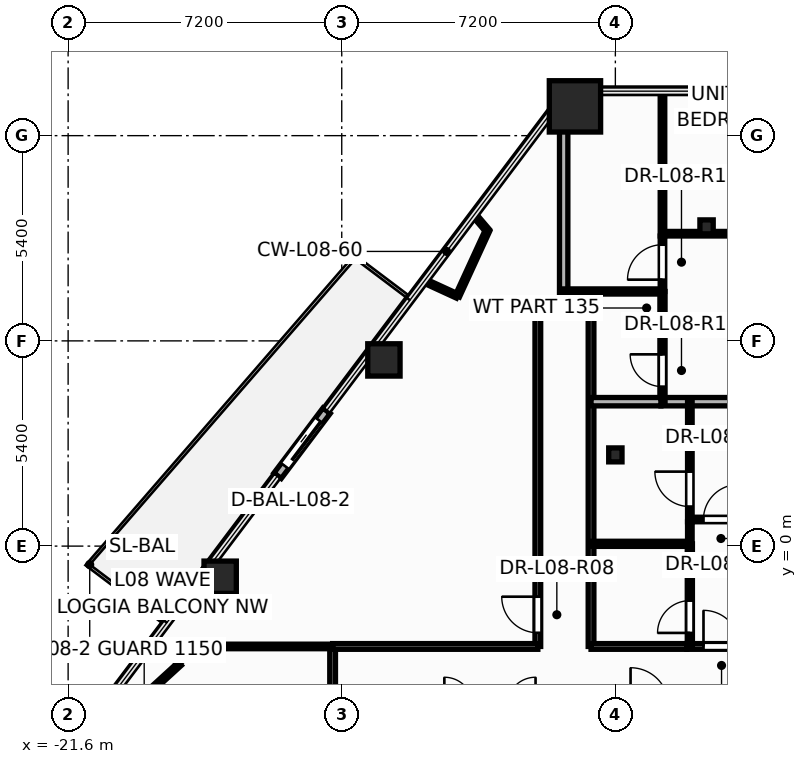
"""IFC4 building model, lengths in metres.
Left out: names, types, materials, properties, quantities, classifications, styles, units other than length and angle.
Written with IfcOpenShell. Run it as: python <this file> out.ifc"""

import sys

from ifc_helpers import new_model, si_unit, direction, frame, frame_2d, origin, origin_2d, place, context, subcontext, project, spatial, rectangle, hollow_rectangle, hollow_circle, i_section, extrude, element, fill, save


model = new_model("IFC4")
c1 = context("Model", 3, precision=1e-05, world=origin(), true_north=direction((0.0, 1.0)))
c2 = subcontext(c1, "Body", "Model", "MODEL_VIEW")
j1 = project(units=[si_unit("LENGTHUNIT", "METRE"), si_unit("PLANEANGLEUNIT", "RADIAN")], contexts=[c1])
p1 = place(None, origin())
s1 = spatial("IfcSite", under=j1, at=p1, CompositionType="ELEMENT")
p2 = place(p1, origin())
s2 = spatial("IfcBuilding", under=s1, at=p2, CompositionType="ELEMENT")
p3 = place(p2, frame((0.0, 0.0, 35.1)))
s3 = spatial("IfcBuildingStorey", under=s2, at=p3, CompositionType="ELEMENT", Elevation=35.1)
p4 = place(p3, frame((-8.263, 11.57, 0.0), z_axis=(0.0, 0.0, 1.0), x_axis=(1.0, 0.0, 0.0)))
e1 = element("IfcColumn", 1, at=p4, inside=s3, PredefinedType="COLUMN", context=c2, shape_type="SweptSolid", body=[
    extrude(hollow_rectangle(XDim=1.35, YDim=1.35, WallThickness=0.065, at=origin_2d()), origin(), (0.0, 0.0, 1.0), 3.6),
])
for number, where, z_axis, x_axis in (
    (2, (-13.29, 4.899, 0.0), (0.0, 0.0, 1.0), (1.0, 0.0, 0.0)),
    (3, (-17.599, -0.819, 0.0), (0.0, 0.0, 1.0), (1.0, 0.0, 0.0)),
):
    element("IfcColumn", number, at=place(p3, frame(where, z_axis=z_axis, x_axis=x_axis)), inside=s3, PredefinedType="COLUMN", context=c2, shape_type="SweptSolid", body=[
        extrude(hollow_circle(Radius=0.425, WallThickness=0.038, at=origin_2d()), origin(), (0.0, 0.0, 1.0), 3.6),
    ])
for number, where, z_axis, x_axis in (
    (4, (-7.2, 2.4, 0.0), (0.0, 0.0, 1.0), (1.0, 0.0, 0.0)),
    (5, (-4.8, 8.4, 0.0), (0.0, 0.0, 1.0), (1.0, 0.0, 0.0)),
):
    element("IfcColumn", number, at=place(p3, frame(where, z_axis=z_axis, x_axis=x_axis)), inside=s3, PredefinedType="COLUMN", context=c2, shape_type="SweptSolid", body=[
        extrude(i_section(OverallWidth=0.35, OverallDepth=0.367, WebThickness=0.025, FlangeThickness=0.032, at=origin_2d()), origin(), (0.0, 0.0, 1.0), 3.6),
    ])
p5 = place(p3, frame((-14.8, 3.561, -0.015), z_axis=(0.0, 0.0, 1.0), x_axis=(-0.601823875366, -0.798628839349, 0.0)))
e6 = element("IfcWall", 6, at=p5, inside=s3, PredefinedType="STANDARD", context=c2, shape_type="SweptSolid", body=[
    extrude(rectangle(XDim=2.14, YDim=0.24, at=frame_2d((1.07, 0.0))), origin(), (0.0, 0.0, 1.0), 2.729),
])
p6 = place(p5, frame((0.32, 0.0, 0.015)))
e7 = element("IfcOpeningElement", 7, at=p6, cuts=e6, PredefinedType="OPENING", context=c2, shape_type="SweptSolid", body=[
    extrude(rectangle(XDim=1.506, YDim=2.204, at=frame_2d((0.75, 1.102))), frame((0.0, 0.13, 0.0), z_axis=(0.0, -1.0, 0.0), x_axis=(1.0, 0.0, 0.0)), (0.0, 0.0, 1.0), 0.26),
])
p7 = place(p3, frame((-5.32, -2.64, 0.0), z_axis=(0.0, 0.0, 1.0), x_axis=(1.0, 0.0, 0.0)))
e8 = element("IfcWall", 8, at=p7, inside=s3, PredefinedType="PARTITIONING", context=c2, shape_type="SweptSolid", body=[
    extrude(rectangle(XDim=13.16, YDim=0.15, at=frame_2d((6.58, 0.0))), origin(), (0.0, 0.0, 1.0), 2.325),
])
p8 = place(p7, frame((0.439, 0.0, 0.0)))
e9 = element("IfcOpeningElement", 9, at=p8, cuts=e8, PredefinedType="OPENING", context=c2, shape_type="SweptSolid", body=[
    extrude(rectangle(XDim=0.956, YDim=2.104, at=frame_2d((0.475, 1.052))), frame((0.0, 0.085, 0.0), z_axis=(0.0, -1.0, 0.0), x_axis=(1.0, 0.0, 0.0)), (0.0, 0.0, 1.0), 0.17),
])
p9 = place(p3, frame((-9.24, -2.64, 0.0), z_axis=(0.0, 0.0, 1.0), x_axis=(0.0, 1.0, 0.0)))
e10 = element("IfcWall", 10, at=p9, inside=s3, PredefinedType="PARTITIONING", context=c2, shape_type="SweptSolid", body=[
    extrude(rectangle(XDim=8.84, YDim=0.15, at=frame_2d((4.42, 0.0))), origin(), (0.0, 0.0, 1.0), 2.325),
])
p10 = place(p9, frame((0.359, 0.0, 0.0)))
e11 = element("IfcOpeningElement", 11, at=p10, cuts=e10, PredefinedType="OPENING", context=c2, shape_type="SweptSolid", body=[
    extrude(rectangle(XDim=0.956, YDim=2.104, at=frame_2d((0.475, 1.052))), frame((0.0, 0.085, 0.0), z_axis=(0.0, -1.0, 0.0), x_axis=(1.0, 0.0, 0.0)), (0.0, 0.0, 1.0), 0.17),
])
p11 = place(p3, frame((-14.64, -10.8, 0.0), z_axis=(0.0, 0.0, 1.0), x_axis=(0.0, 1.0, 0.0)))
e12 = element("IfcWall", 12, at=p11, inside=s3, PredefinedType="PARTITIONING", context=c2, shape_type="SweptSolid", body=[
    extrude(rectangle(XDim=8.16, YDim=0.15, at=frame_2d((4.08, 0.0))), origin(), (0.0, 0.0, 1.0), 2.325),
])
p12 = place(p11, frame((0.359, 0.0, 0.0)))
e13 = element("IfcOpeningElement", 13, at=p12, cuts=e12, PredefinedType="OPENING", context=c2, shape_type="SweptSolid", body=[
    extrude(rectangle(XDim=0.956, YDim=2.104, at=frame_2d((0.475, 1.052))), frame((0.0, 0.085, 0.0), z_axis=(0.0, -1.0, 0.0), x_axis=(1.0, 0.0, 0.0)), (0.0, 0.0, 1.0), 0.17),
])
p13 = place(p3, frame((-5.96, 8.22, 0.0), z_axis=(0.0, 0.0, 1.0), x_axis=(1.0, 0.0, 0.0)))
e14 = element("IfcWall", 14, at=p13, inside=s3, PredefinedType="PARTITIONING", context=c2, shape_type="SweptSolid", body=[
    extrude(rectangle(XDim=7.32, YDim=0.12, at=frame_2d((3.66, 0.0))), origin(), (0.0, 0.0, 1.0), 2.325),
])
p14 = place(p13, frame((3.101, 0.0, 0.0)))
e15 = element("IfcOpeningElement", 15, at=p14, cuts=e14, PredefinedType="OPENING", context=c2, shape_type="SweptSolid", body=[
    extrude(rectangle(XDim=0.926, YDim=2.104, at=frame_2d((0.46, 1.052))), frame((0.0, 0.07, 0.0), z_axis=(0.0, -1.0, 0.0), x_axis=(1.0, 0.0, 0.0)), (0.0, 0.0, 1.0), 0.14),
])
p15 = place(p3, frame((-6.0, 3.8, 0.0), z_axis=(0.0, 0.0, 1.0), x_axis=(1.0, 0.0, 0.0)))
e16 = element("IfcWall", 16, at=p15, inside=s3, PredefinedType="PARTITIONING", context=c2, shape_type="SweptSolid", body=[
    extrude(rectangle(XDim=13.84, YDim=0.22, at=frame_2d((6.92, 0.0))), origin(), (0.0, 0.0, 1.0), 2.325),
])
p16 = place(p3, frame((-5.24, 0.7, 0.0), z_axis=(0.0, 0.0, 1.0), x_axis=(1.0, 0.0, 0.0)))
e17 = element("IfcWall", 17, at=p16, inside=s3, PredefinedType="PARTITIONING", context=c2, shape_type="SweptSolid", body=[
    extrude(rectangle(XDim=6.078, YDim=0.12, at=frame_2d((3.039, 0.0))), origin(), (0.0, 0.0, 1.0), 2.325),
])
p17 = place(p16, frame((0.358, 0.0, 0.0)))
e18 = element("IfcOpeningElement", 18, at=p17, cuts=e17, PredefinedType="OPENING", context=c2, shape_type="SweptSolid", body=[
    extrude(rectangle(XDim=0.926, YDim=2.104, at=frame_2d((0.46, 1.052))), frame((0.0, 0.07, 0.0), z_axis=(0.0, -1.0, 0.0), x_axis=(1.0, 0.0, 0.0)), (0.0, 0.0, 1.0), 0.14),
])
p18 = place(p3, frame((-14.64, -2.64, 0.0), z_axis=(0.0, 0.0, 1.0), x_axis=(1.0, 0.0, 0.0)))
e19 = element("IfcWall", 19, at=p18, inside=s3, PredefinedType="PARTITIONING", context=c2, shape_type="SweptSolid", body=[
    extrude(rectangle(XDim=5.4, YDim=0.15, at=frame_2d((2.7, 0.0))), origin(), (0.0, 0.0, 1.0), 3.35),
])
p19 = place(p3, frame((-8.56, 6.2, 0.0), z_axis=(0.0, 0.0, 1.0), x_axis=(0.0, 1.0, 0.0)))
e20 = element("IfcWall", 20, at=p19, inside=s3, PredefinedType="PARTITIONING", context=c2, shape_type="SweptSolid", body=[
    extrude(rectangle(XDim=5.641, YDim=0.22, at=frame_2d((2.821, 0.0))), origin(), (0.0, 0.0, 1.0), 2.325),
])
p20 = place(p3, frame((-19.28, -2.64, 0.0), z_axis=(0.0, 0.0, 1.0), x_axis=(1.0, 0.0, 0.0)))
e21 = element("IfcWall", 21, at=p20, inside=s3, PredefinedType="PARTITIONING", context=c2, shape_type="SweptSolid", body=[
    extrude(rectangle(XDim=4.64, YDim=0.12, at=frame_2d((2.32, 0.0))), origin(), (0.0, 0.0, 1.0), 2.713),
])
p21 = place(p3, frame((-7.84, -2.64, 0.0), z_axis=(0.0, 0.0, 1.0), x_axis=(0.0, 1.0, 0.0)))
e22 = element("IfcWall", 22, at=p21, inside=s3, PredefinedType="PARTITIONING", context=c2, shape_type="SweptSolid", body=[
    extrude(rectangle(XDim=8.84, YDim=0.15, at=frame_2d((4.42, 0.0))), origin(), (0.0, 0.0, 1.0), 2.325),
])
p22 = place(p3, frame((-5.96, 8.16, 0.0), z_axis=(0.0, 0.0, 1.0), x_axis=(0.0, 1.0, 0.0)))
e23 = element("IfcWall", 23, at=p22, inside=s3, PredefinedType="PARTITIONING", context=c2, shape_type="SweptSolid", body=[
    extrude(rectangle(XDim=3.811, YDim=0.12, at=frame_2d((1.905, 0.0))), origin(), (0.0, 0.0, 1.0), 2.325),
])
p23 = place(p3, frame((-5.24, 0.64, 0.0), z_axis=(0.0, 0.0, 1.0), x_axis=(0.0, 1.0, 0.0)))
e24 = element("IfcWall", 24, at=p23, inside=s3, PredefinedType="PARTITIONING", context=c2, shape_type="SweptSolid", body=[
    extrude(rectangle(XDim=3.16, YDim=0.12, at=frame_2d((1.58, 0.0))), origin(), (0.0, 0.0, 1.0), 2.325),
])
p24 = place(p23, frame((0.4, 0.0, 0.0)))
e25 = element("IfcOpeningElement", 25, at=p24, cuts=e24, PredefinedType="OPENING", context=c2, shape_type="SweptSolid", body=[
    extrude(rectangle(XDim=0.926, YDim=2.104, at=frame_2d((0.46, 1.052))), frame((0.0, 0.07, 0.0), z_axis=(0.0, -1.0, 0.0), x_axis=(1.0, 0.0, 0.0)), (0.0, 0.0, 1.0), 0.14),
])
p25 = place(p3, frame((-5.96, 3.8, 0.0), z_axis=(0.0, 0.0, 1.0), x_axis=(0.0, 1.0, 0.0)))
e26 = element("IfcWall", 26, at=p25, inside=s3, PredefinedType="PARTITIONING", context=c2, shape_type="SweptSolid", body=[
    extrude(rectangle(XDim=2.9, YDim=0.135, at=frame_2d((1.45, 0.0))), origin(), (0.0, 0.0, 1.0), 2.325),
])
p26 = place(p25, frame((0.396, 0.0, 0.0)))
e27 = element("IfcOpeningElement", 27, at=p26, cuts=e26, PredefinedType="OPENING", context=c2, shape_type="SweptSolid", body=[
    extrude(rectangle(XDim=0.856, YDim=2.104, at=frame_2d((0.425, 1.052))), frame((0.0, 0.078, 0.0), z_axis=(0.0, -1.0, 0.0), x_axis=(1.0, 0.0, 0.0)), (0.0, 0.0, 1.0), 0.155),
])
p27 = place(p3, frame((-5.24, -2.64, 0.0), z_axis=(0.0, 0.0, 1.0), x_axis=(0.0, 1.0, 0.0)))
e28 = element("IfcWall", 28, at=p27, inside=s3, PredefinedType="PARTITIONING", context=c2, shape_type="SweptSolid", body=[
    extrude(rectangle(XDim=2.7, YDim=0.135, at=frame_2d((1.35, 0.0))), origin(), (0.0, 0.0, 1.0), 3.35),
])
p28 = place(p27, frame((0.356, 0.0, 0.0)))
e29 = element("IfcOpeningElement", 29, at=p28, cuts=e28, PredefinedType="OPENING", context=c2, shape_type="SweptSolid", body=[
    extrude(rectangle(XDim=0.856, YDim=2.104, at=frame_2d((0.425, 1.052))), frame((0.0, 0.078, 0.0), z_axis=(0.0, -1.0, 0.0), x_axis=(1.0, 0.0, 0.0)), (0.0, 0.0, 1.0), 0.155),
])
p29 = place(p3, frame((-7.84, -2.64, 0.0), z_axis=(0.0, 0.0, 1.0), x_axis=(1.0, 0.0, 0.0)))
e30 = element("IfcWall", 30, at=p29, inside=s3, PredefinedType="PARTITIONING", context=c2, shape_type="SweptSolid", body=[
    extrude(rectangle(XDim=2.518, YDim=0.15, at=frame_2d((1.259, 0.0))), origin(), (0.0, 0.0, 1.0), 2.325),
])
for number, where, z_axis, x_axis in (
    (31, (-8.56, 6.7, 0.0), (0.0, 0.0, 1.0), (1.0, 0.0, 0.0)),
    (32, (-7.84, 0.06, 0.0), (0.0, 0.0, 1.0), (1.0, 0.0, 0.0)),
):
    element("IfcWall", number, at=place(p3, frame(where, z_axis=z_axis, x_axis=x_axis)), inside=s3, PredefinedType="PARTITIONING", context=c2, shape_type="SweptSolid", body=[
        extrude(rectangle(XDim=2.6, YDim=0.135, at=frame_2d((1.3, 0.0))), origin(), (0.0, 0.0, 1.0), 2.325),
    ])
p30 = place(p3, frame((-18.662, -3.096, 0.0), z_axis=(0.0, 0.0, 1.0), x_axis=(-0.738587935194, -0.674157149325, 0.0)))
e33 = element("IfcWall", 33, at=p30, inside=s3, PredefinedType="PARTITIONING", context=c2, shape_type="SweptSolid", body=[
    extrude(rectangle(XDim=2.012, YDim=0.12, at=frame_2d((1.006, 0.0))), origin(), (0.0, 0.0, 1.0), 3.35),
])
p31 = place(p3, frame((-7.84, 3.8, 0.0), z_axis=(0.0, 0.0, 1.0), x_axis=(1.0, 0.0, 0.0)))
e34 = element("IfcWall", 34, at=p31, inside=s3, PredefinedType="PARTITIONING", context=c2, shape_type="SweptSolid", body=[
    extrude(rectangle(XDim=1.838, YDim=0.22, at=frame_2d((0.919, 0.0))), origin(), (0.0, 0.0, 1.0), 2.325),
])
p32 = place(p3, frame((-10.565, 8.302, 0.0), z_axis=(0.0, 0.0, 1.0), x_axis=(-0.417514536704, -0.90867024362, 0.0)))
e35 = element("IfcWall", 35, at=p32, inside=s3, PredefinedType="PARTITIONING", context=c2, shape_type="SweptSolid", body=[
    extrude(rectangle(XDim=1.896, YDim=0.12, at=frame_2d((0.948, 0.0))), origin(), (0.0, 0.0, 1.0), 3.35),
])
p33 = place(p3, frame((-5.96, 6.7, 0.0), z_axis=(0.0, 0.0, 1.0), x_axis=(0.0, 1.0, 0.0)))
e36 = element("IfcWall", 36, at=p33, inside=s3, PredefinedType="PARTITIONING", context=c2, shape_type="SweptSolid", body=[
    extrude(rectangle(XDim=1.458, YDim=0.12, at=frame_2d((0.729, 0.0))), origin(), (0.0, 0.0, 1.0), 2.325),
])
p34 = place(p33, frame((0.311, 0.0, 0.0)))
e37 = element("IfcOpeningElement", 37, at=p34, cuts=e36, PredefinedType="OPENING", context=c2, shape_type="SweptSolid", body=[
    extrude(rectangle(XDim=0.926, YDim=2.104, at=frame_2d((0.46, 1.052))), frame((0.0, 0.07, 0.0), z_axis=(0.0, -1.0, 0.0), x_axis=(1.0, 0.0, 0.0)), (0.0, 0.0, 1.0), 0.14),
])
p35 = place(p3, frame((-11.356, 6.579, 0.0), z_axis=(0.0, 0.0, 1.0), x_axis=(-0.908713919018, 0.417419469339, 0.0)))
e38 = element("IfcWall", 38, at=p35, inside=s3, PredefinedType="PARTITIONING", context=c2, shape_type="SweptSolid", body=[
    extrude(rectangle(XDim=0.945, YDim=0.12, at=frame_2d((0.473, 0.0))), origin(), (0.0, 0.0, 1.0), 2.713),
])
p36 = place(p3, frame((-19.287, -2.411, 0.0), z_axis=(0.0, 0.0, 1.0), x_axis=(0.674125797279, -0.738616551021, 0.0)))
e39 = element("IfcWall", 39, at=p36, inside=s3, PredefinedType="PARTITIONING", context=c2, shape_type="SweptSolid", body=[
    extrude(rectangle(XDim=0.927, YDim=0.12, at=frame_2d((0.464, 0.0))), origin(), (0.0, 0.0, 1.0), 2.713),
])
p37 = place(p3, frame((-9.24, 6.2, 0.0), z_axis=(0.0, 0.0, 1.0), x_axis=(1.0, 0.0, 0.0)))
e40 = element("IfcWall", 40, at=p37, inside=s3, PredefinedType="PARTITIONING", context=c2, shape_type="SweptSolid", body=[
    extrude(rectangle(XDim=1.4, YDim=0.15, at=frame_2d((0.7, 0.0))), origin(), (0.0, 0.0, 1.0), 3.35),
])
p38 = place(p3, frame((-5.24, 0.06, 0.0), z_axis=(0.0, 0.0, 1.0), x_axis=(0.0, 1.0, 0.0)))
e41 = element("IfcWall", 41, at=p38, inside=s3, PredefinedType="PARTITIONING", context=c2, shape_type="SweptSolid", body=[
    extrude(rectangle(XDim=0.578, YDim=0.12, at=frame_2d((0.289, 0.0))), origin(), (0.0, 0.0, 1.0), 3.35),
])
p39 = place(p3, frame((-10.909, 8.707, 0.0), z_axis=(0.0, 0.0, 1.0), x_axis=(0.648594610132, -0.761134043193, 0.0)))
e42 = element("IfcWall", 42, at=p39, inside=s3, PredefinedType="PARTITIONING", context=c2, shape_type="SweptSolid", body=[
    extrude(rectangle(XDim=0.531, YDim=0.12, at=frame_2d((0.266, 0.0))), origin(), (0.0, 0.0, 1.0), 2.713),
])
p40 = place(p6, origin())
e43 = element("IfcDoor", 43, at=p40, inside=s3, OperationType="SLIDING_TO_RIGHT", PredefinedType="DOOR", context=c2, shape_type="SweptSolid", body=[
    extrude(rectangle(XDim=1.5, YDim=2.2, at=frame_2d((0.75, 1.1))), frame((0.0, 0.025, 0.0), z_axis=(0.0, -1.0, 0.0), x_axis=(1.0, 0.0, 0.0)), (0.0, 0.0, 1.0), 0.05),
])
fill(e7, e43)
p41 = place(p10, origin())
e44 = element("IfcDoor", 44, at=p41, inside=s3, OperationType="SINGLE_SWING_RIGHT", PredefinedType="DOOR", context=c2, shape_type="SweptSolid", body=[
    extrude(rectangle(XDim=0.95, YDim=2.1, at=frame_2d((0.475, 1.05))), frame((0.0, 0.025, 0.0), z_axis=(0.0, -1.0, 0.0), x_axis=(1.0, 0.0, 0.0)), (0.0, 0.0, 1.0), 0.05),
])
fill(e11, e44)
p42 = place(p28, origin())
e45 = element("IfcDoor", 45, at=p42, inside=s3, OperationType="SINGLE_SWING_LEFT", PredefinedType="DOOR", context=c2, shape_type="SweptSolid", body=[
    extrude(rectangle(XDim=0.85, YDim=2.1, at=frame_2d((0.425, 1.05))), frame((0.0, 0.025, 0.0), z_axis=(0.0, -1.0, 0.0), x_axis=(1.0, 0.0, 0.0)), (0.0, 0.0, 1.0), 0.05),
])
fill(e29, e45)
p43 = place(p24, origin())
e46 = element("IfcDoor", 46, at=p43, inside=s3, OperationType="SINGLE_SWING_RIGHT", PredefinedType="DOOR", context=c2, shape_type="SweptSolid", body=[
    extrude(rectangle(XDim=0.92, YDim=2.1, at=frame_2d((0.46, 1.05))), frame((0.0, 0.025, 0.0), z_axis=(0.0, -1.0, 0.0), x_axis=(1.0, 0.0, 0.0)), (0.0, 0.0, 1.0), 0.05),
])
fill(e25, e46)
p44 = place(p8, origin())
e47 = element("IfcDoor", 47, at=p44, inside=s3, OperationType="SINGLE_SWING_LEFT", PredefinedType="DOOR", context=c2, shape_type="SweptSolid", body=[
    extrude(rectangle(XDim=0.95, YDim=2.1, at=frame_2d((0.475, 1.05))), frame((0.0, 0.025, 0.0), z_axis=(0.0, -1.0, 0.0), x_axis=(1.0, 0.0, 0.0)), (0.0, 0.0, 1.0), 0.05),
])
fill(e9, e47)
p45 = place(p17, origin())
e48 = element("IfcDoor", 48, at=p45, inside=s3, OperationType="SINGLE_SWING_RIGHT", PredefinedType="DOOR", context=c2, shape_type="SweptSolid", body=[
    extrude(rectangle(XDim=0.92, YDim=2.1, at=frame_2d((0.46, 1.05))), frame((0.0, 0.025, 0.0), z_axis=(0.0, -1.0, 0.0), x_axis=(1.0, 0.0, 0.0)), (0.0, 0.0, 1.0), 0.05),
])
fill(e18, e48)
p46 = place(p26, origin())
e49 = element("IfcDoor", 49, at=p46, inside=s3, OperationType="SINGLE_SWING_RIGHT", PredefinedType="DOOR", context=c2, shape_type="SweptSolid", body=[
    extrude(rectangle(XDim=0.85, YDim=2.1, at=frame_2d((0.425, 1.05))), frame((0.0, 0.025, 0.0), z_axis=(0.0, -1.0, 0.0), x_axis=(1.0, 0.0, 0.0)), (0.0, 0.0, 1.0), 0.05),
])
fill(e27, e49)
p47 = place(p34, origin())
e50 = element("IfcDoor", 50, at=p47, inside=s3, OperationType="SINGLE_SWING_LEFT", PredefinedType="DOOR", context=c2, shape_type="SweptSolid", body=[
    extrude(rectangle(XDim=0.92, YDim=2.1, at=frame_2d((0.46, 1.05))), frame((0.0, 0.025, 0.0), z_axis=(0.0, -1.0, 0.0), x_axis=(1.0, 0.0, 0.0)), (0.0, 0.0, 1.0), 0.05),
])
fill(e37, e50)
save(model, sys.argv[1])
